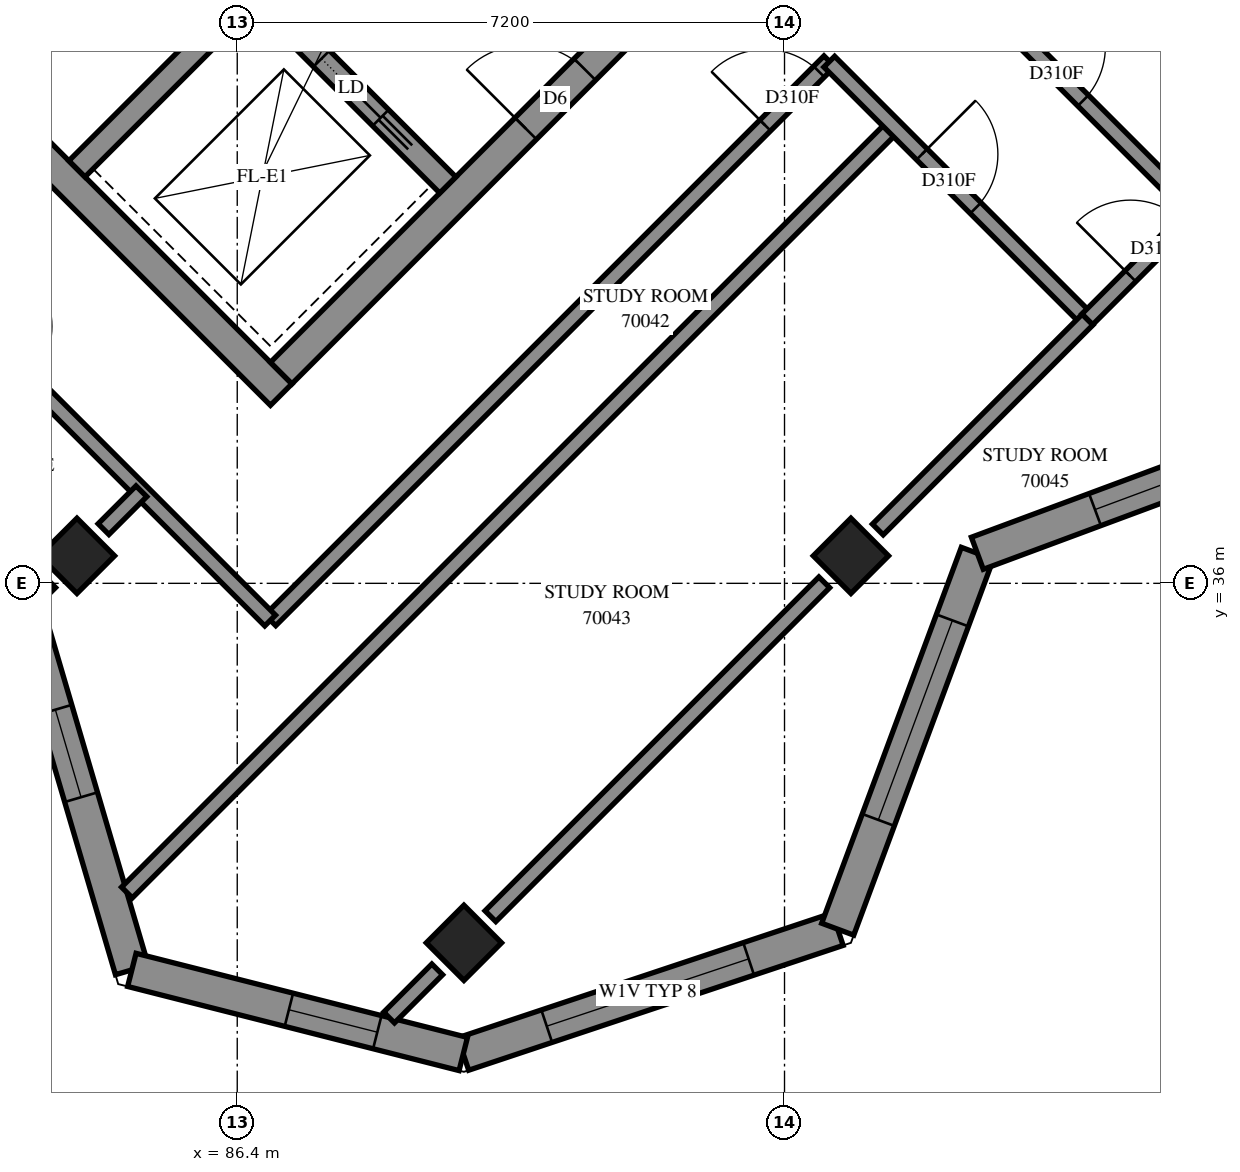
"""IFC4 building model, lengths in metres.
Left out: names, types, materials, properties, quantities, classifications, styles, units other than length and angle.
Written with IfcOpenShell. Run it as: python <this file> out.ifc"""

import sys

from ifc_helpers import new_model, si_unit, direction, frame, frame_2d, origin, origin_2d, place, context, subcontext, project, spatial, polyline, rectangle, outline, extrude, element, fill, save


model = new_model("IFC4")
c1 = context("Model", 3, precision=1e-05, world=origin(), true_north=direction((0.0, 1.0)))
c2 = subcontext(c1, "Body", "Model", "MODEL_VIEW")
j1 = project(units=[si_unit("LENGTHUNIT", "METRE"), si_unit("PLANEANGLEUNIT", "RADIAN")], contexts=[c1])
p1 = place(None, origin())
s1 = spatial("IfcSite", under=j1, at=p1, CompositionType="ELEMENT")
p2 = place(p1, origin())
s2 = spatial("IfcBuilding", under=s1, at=p2, CompositionType="ELEMENT")
p3 = place(p2, frame((0.0, 0.0, 257.4)))
s3 = spatial("IfcBuildingStorey", under=s2, at=p3, CompositionType="ELEMENT", Elevation=257.4)
for number, where, z_axis, x_axis in (
    (1, (84.291, 36.362, 0.0), (0.0, 0.0, 1.0), (0.707, -0.707, 0.0)),
    (2, (94.474, 36.362, 0.0), (0.0, 0.0, 1.0), (0.707, -0.707, 0.0)),
    (3, (89.382, 31.271, 0.0), (0.0, 0.0, 1.0), (0.707, -0.707, 0.0)),
):
    element("IfcColumn", number, at=place(p3, frame(where, z_axis=z_axis, x_axis=x_axis)), inside=s3, PredefinedType="COLUMN", context=c2, shape_type="SweptSolid", body=[
        extrude(rectangle(XDim=0.7, YDim=0.7, at=origin_2d()), origin(), (0.0, 0.0, 1.0), 3.1),
    ])
p4 = place(p3, frame((76.23, 49.231, -0.3), z_axis=(0.0, 0.0, 1.0), x_axis=(0.7071034917, -0.7071100706, 0.0)))
e4 = element("IfcWall", 4, at=p4, inside=s3, PredefinedType="SHEAR", context=c2, shape_type="SweptSolid", body=[
    extrude(rectangle(XDim=15.2, YDim=0.4, at=frame_2d((7.6, 0.0))), origin(), (0.0, 0.0, 1.0), 2.7),
])
p5 = place(p3, frame((86.978, 38.766, -0.3), z_axis=(0.0, 0.0, 1.0), x_axis=(0.7071067812, 0.7071067812, 0.0)))
e5 = element("IfcWall", 5, at=p5, inside=s3, PredefinedType="SHEAR", context=c2, shape_type="SweptSolid", body=[
    extrude(rectangle(XDim=14.4, YDim=0.4, at=frame_2d((7.2, 0.0))), origin(), (0.0, 0.0, 1.0), 2.7),
])
p6 = place(p5, frame((4.55, 0.0, 0.3)))
e6 = element("IfcOpeningElement", 6, at=p6, cuts=e5, PredefinedType="OPENING", context=c2, shape_type="SweptSolid", body=[
    extrude(rectangle(XDim=1.1, YDim=2.1, at=frame_2d((0.55, 1.05))), frame((0.0, 0.21, 0.0), z_axis=(0.0, -1.0, 0.0), x_axis=(1.0, 0.0, 0.0)), (0.0, 0.0, 1.0), 0.42),
])
p7 = place(p5, frame((11.35, 0.0, 0.3)))
e7 = element("IfcOpeningElement", 7, at=p7, cuts=e5, PredefinedType="OPENING", context=c2, shape_type="SweptSolid", body=[
    extrude(rectangle(XDim=1.1, YDim=2.1, at=frame_2d((0.55, 1.05))), frame((0.0, 0.21, 0.0), z_axis=(0.0, -1.0, 0.0), x_axis=(1.0, 0.0, 0.0)), (0.0, 0.0, 1.0), 0.42),
])
p8 = place(p3, frame((84.291, 41.453, 0.0), z_axis=(0.0, 0.0, 1.0), x_axis=(0.7071067812, 0.7071067812, 0.0)))
e8 = element("IfcWall", 8, at=p8, inside=s3, PredefinedType="SOLIDWALL", context=c2, shape_type="SweptSolid", body=[
    extrude(rectangle(XDim=3.3, YDim=0.3, at=frame_2d((1.65, 0.0))), origin(), (0.0, 0.0, 1.0), 3.1),
])
p9 = place(p3, frame((78.988, 51.423, 0.0), z_axis=(0.0, 0.0, 1.0), x_axis=(0.7071067812, -0.7071067812, 0.0)))
e9 = element("IfcWall", 9, at=p9, inside=s3, PredefinedType="SOLIDWALL", context=c2, shape_type="SweptSolid", body=[
    extrude(rectangle(XDim=14.4, YDim=0.3, at=frame_2d((7.2, 0.0))), origin(), (0.0, 0.0, 1.0), 3.1),
])
p10 = place(p9, frame((1.35, 0.0, 0.0)))
e10 = element("IfcOpeningElement", 10, at=p10, cuts=e9, PredefinedType="OPENING", context=c2, shape_type="SweptSolid", body=[
    extrude(rectangle(XDim=0.9, YDim=2.1, at=frame_2d((0.45, 1.05))), frame((0.0, 0.16, 0.0), z_axis=(0.0, -1.0, 0.0), x_axis=(1.0, 0.0, 0.0)), (0.0, 0.0, 1.0), 0.32),
])
p11 = place(p9, frame((4.95, 0.0, 0.0)))
e11 = element("IfcOpeningElement", 11, at=p11, cuts=e9, PredefinedType="OPENING", context=c2, shape_type="SweptSolid", body=[
    extrude(rectangle(XDim=0.9, YDim=2.1, at=frame_2d((0.45, 1.05))), frame((0.0, 0.16, 0.0), z_axis=(0.0, -1.0, 0.0), x_axis=(1.0, 0.0, 0.0)), (0.0, 0.0, 1.0), 0.32),
])
p12 = place(p9, frame((8.55, 0.0, 0.0)))
e12 = element("IfcOpeningElement", 12, at=p12, cuts=e9, PredefinedType="OPENING", context=c2, shape_type="SweptSolid", body=[
    extrude(rectangle(XDim=0.9, YDim=2.1, at=frame_2d((0.45, 1.05))), frame((0.0, 0.16, 0.0), z_axis=(0.0, -1.0, 0.0), x_axis=(1.0, 0.0, 0.0)), (0.0, 0.0, 1.0), 0.32),
])
p13 = place(p9, frame((12.05, 0.0, 0.0)))
e13 = element("IfcOpeningElement", 13, at=p13, cuts=e9, PredefinedType="OPENING", context=c2, shape_type="SweptSolid", body=[
    extrude(rectangle(XDim=1.1, YDim=2.1, at=frame_2d((0.55, 1.05))), frame((0.0, 0.16, 0.0), z_axis=(0.0, -1.0, 0.0), x_axis=(1.0, 0.0, 0.0)), (0.0, 0.0, 1.0), 0.32),
])
p14 = place(p3, frame((89.374, 29.808, 0.0), z_axis=(0.0, 0.0, 1.0), x_axis=(0.9486852237, 0.3162219889, 0.0)))
e14 = element("IfcWall", 14, at=p14, inside=s3, PredefinedType="SOLIDWALL", context=c2, shape_type="SweptSolid", body=[
    extrude(outline(polyline([(-0.066, -0.225), (5.301, -0.225), (5.085, 0.225), (0.066, 0.225), (-0.066, -0.225)])), origin(), (0.0, 0.0, 1.0), 3.1),
])
p15 = place(p14, frame((1.157, 0.0, 0.45)))
e15 = element("IfcOpeningElement", 15, at=p15, cuts=e14, PredefinedType="OPENING", context=c2, shape_type="SweptSolid", body=[
    extrude(rectangle(XDim=2.8, YDim=2.55, at=frame_2d((1.4, 1.275))), frame((0.0, 0.235, 0.0), z_axis=(0.0, -1.0, 0.0), x_axis=(1.0, 0.0, 0.0)), (0.0, 0.0, 1.0), 0.47),
])
p16 = place(p3, frame((94.3, 31.45, 0.0), z_axis=(0.0, 0.0, 1.0), x_axis=(0.3481927166, 0.9374229739, 0.0)))
e16 = element("IfcWall", 16, at=p16, inside=s3, PredefinedType="SOLIDWALL", context=c2, shape_type="SweptSolid", body=[
    extrude(outline(polyline([(-0.108, -0.225), (5.172, -0.225), (5.379, 0.225), (0.108, 0.225), (-0.108, -0.225)])), origin(), (0.0, 0.0, 1.0), 3.1),
])
p17 = place(p16, frame((1.534, 0.0, 0.45)))
e17 = element("IfcOpeningElement", 17, at=p17, cuts=e16, PredefinedType="OPENING", context=c2, shape_type="SweptSolid", body=[
    extrude(rectangle(XDim=2.8, YDim=2.55, at=frame_2d((1.4, 1.275))), frame((0.0, 0.235, 0.0), z_axis=(0.0, -1.0, 0.0), x_axis=(1.0, 0.0, 0.0)), (0.0, 0.0, 1.0), 0.47),
])
p18 = place(p3, frame((96.137, 36.395, 0.0), z_axis=(0.0, 0.0, 1.0), x_axis=(0.937429161, 0.3481760591, 0.0)))
e18 = element("IfcWall", 18, at=p18, inside=s3, PredefinedType="SOLIDWALL", context=c2, shape_type="SweptSolid", body=[
    extrude(outline(polyline([(0.103, -0.225), (5.383, -0.225), (5.168, 0.225), (-0.103, 0.225), (0.103, -0.225)])), origin(), (0.0, 0.0, 1.0), 3.1),
])
p19 = place(p18, frame((1.651, 0.0, 0.45)))
e19 = element("IfcOpeningElement", 19, at=p19, cuts=e18, PredefinedType="OPENING", context=c2, shape_type="SweptSolid", body=[
    extrude(rectangle(XDim=2.8, YDim=2.55, at=frame_2d((1.4, 1.275))), frame((0.0, 0.235, 0.0), z_axis=(0.0, -1.0, 0.0), x_axis=(1.0, 0.0, 0.0)), (0.0, 0.0, 1.0), 0.47),
])
p20 = place(p3, frame((83.719, 35.316, 0.0), z_axis=(0.0, 0.0, 1.0), x_axis=(0.2820825406, -0.9593901398, 0.0)))
e20 = element("IfcWall", 20, at=p20, inside=s3, PredefinedType="SOLIDWALL", context=c2, shape_type="SweptSolid", body=[
    extrude(outline(polyline([(0.123, -0.225), (4.716, -0.225), (4.46, 0.225), (-0.123, 0.225), (0.123, -0.225)])), origin(), (0.0, 0.0, 1.0), 3.1),
])
p21 = place(p20, frame((1.02, 0.0, 0.45)))
e21 = element("IfcOpeningElement", 21, at=p21, cuts=e20, PredefinedType="OPENING", context=c2, shape_type="SweptSolid", body=[
    extrude(rectangle(XDim=1.2, YDim=2.55, at=frame_2d((0.6, 1.275))), frame((0.0, 0.235, 0.0), z_axis=(0.0, -1.0, 0.0), x_axis=(1.0, 0.0, 0.0)), (0.0, 0.0, 1.0), 0.47),
])
p22 = place(p3, frame((85.014, 30.914, 0.0), z_axis=(0.0, 0.0, 1.0), x_axis=(0.9692746151, -0.2459811384, 0.0)))
e22 = element("IfcWall", 22, at=p22, inside=s3, PredefinedType="SOLIDWALL", context=c2, shape_type="SweptSolid", body=[
    extrude(outline(polyline([(-0.128, -0.225), (4.564, -0.225), (4.432, 0.225), (0.128, 0.225), (-0.128, -0.225)])), origin(), (0.0, 0.0, 1.0), 3.1),
])
p23 = place(p22, frame((2.131, 0.0, 0.45)))
e23 = element("IfcOpeningElement", 23, at=p23, cuts=e22, PredefinedType="OPENING", context=c2, shape_type="SweptSolid", body=[
    extrude(rectangle(XDim=1.2, YDim=2.55, at=frame_2d((0.6, 1.275))), frame((0.0, 0.235, 0.0), z_axis=(0.0, -1.0, 0.0), x_axis=(1.0, 0.0, 0.0)), (0.0, 0.0, 1.0), 0.47),
])
p24 = place(p3, frame((84.949, 31.932, 0.0), z_axis=(0.0, 0.0, 1.0), x_axis=(0.7071768688, 0.7070366866, 0.0)))
e24 = element("IfcWall", 24, at=p24, inside=s3, PredefinedType="PARTITIONING", context=c2, shape_type="SweptSolid", body=[
    extrude(rectangle(XDim=14.267, YDim=0.2, at=frame_2d((7.134, 0.0))), origin(), (0.0, 0.0, 1.0), 3.1),
])
p25 = place(p3, frame((86.836, 35.514, 0.0), z_axis=(0.0, 0.0, 1.0), x_axis=(0.7071067812, 0.7071067812, 0.0)))
e25 = element("IfcWall", 25, at=p25, inside=s3, PredefinedType="PARTITIONING", context=c2, shape_type="SweptSolid", body=[
    extrude(rectangle(XDim=10.4, YDim=0.2, at=frame_2d((5.2, 0.0))), origin(), (0.0, 0.0, 1.0), 3.1),
])
p26 = place(p25, frame((9.207, 0.0, 0.0)))
e26 = element("IfcOpeningElement", 26, at=p26, cuts=e25, PredefinedType="OPENING", context=c2, shape_type="SweptSolid", body=[
    extrude(rectangle(XDim=1.0, YDim=2.1, at=frame_2d((0.5, 1.05))), frame((0.0, 0.11, 0.0), z_axis=(0.0, -1.0, 0.0), x_axis=(1.0, 0.0, 0.0)), (0.0, 0.0, 1.0), 0.22),
])
p27 = place(p3, frame((80.747, 41.597, 0.0), z_axis=(0.0, 0.0, 1.0), x_axis=(0.7071067812, -0.7071067812, 0.0)))
e27 = element("IfcWall", 27, at=p27, inside=s3, PredefinedType="PARTITIONING", context=c2, shape_type="SweptSolid", body=[
    extrude(rectangle(XDim=8.607, YDim=0.2, at=frame_2d((4.303, 0.0))), origin(), (0.0, 0.0, 1.0), 3.1),
])
p28 = place(p27, frame((0.195, 0.0, 0.0)))
e28 = element("IfcOpeningElement", 28, at=p28, cuts=e27, PredefinedType="OPENING", context=c2, shape_type="SweptSolid", body=[
    extrude(rectangle(XDim=1.0, YDim=2.1, at=frame_2d((0.5, 1.05))), frame((0.0, 0.11, 0.0), z_axis=(0.0, -1.0, 0.0), x_axis=(1.0, 0.0, 0.0)), (0.0, 0.0, 1.0), 0.22),
])
p29 = place(p27, frame((3.133, 0.0, 0.0)))
e29 = element("IfcOpeningElement", 29, at=p29, cuts=e27, PredefinedType="OPENING", context=c2, shape_type="SweptSolid", body=[
    extrude(rectangle(XDim=1.0, YDim=2.1, at=frame_2d((0.5, 1.05))), frame((0.0, 0.11, 0.0), z_axis=(0.0, -1.0, 0.0), x_axis=(1.0, 0.0, 0.0)), (0.0, 0.0, 1.0), 0.22),
])
p30 = place(p3, frame((89.731, 31.621, 0.0), z_axis=(0.0, 0.0, 1.0), x_axis=(0.7071067812, 0.7071067812, 0.0)))
e30 = element("IfcWall", 30, at=p30, inside=s3, PredefinedType="PARTITIONING", context=c2, shape_type="SweptSolid", body=[
    extrude(rectangle(XDim=6.211, YDim=0.2, at=frame_2d((3.106, 0.0))), origin(), (0.0, 0.0, 1.0), 2.6),
])
p31 = place(p3, frame((95.603, 44.277, 0.0), z_axis=(0.0, 0.0, 1.0), x_axis=(0.7071067812, -0.7071067812, 0.0)))
e31 = element("IfcWall", 31, at=p31, inside=s3, PredefinedType="PARTITIONING", context=c2, shape_type="SweptSolid", body=[
    extrude(rectangle(XDim=4.797, YDim=0.2, at=frame_2d((2.398, 0.0))), origin(), (0.0, 0.0, 1.0), 3.1),
])
p32 = place(p31, frame((1.723, 0.0, 0.0)))
e32 = element("IfcOpeningElement", 32, at=p32, cuts=e31, PredefinedType="OPENING", context=c2, shape_type="SweptSolid", body=[
    extrude(rectangle(XDim=1.0, YDim=2.1, at=frame_2d((0.5, 1.05))), frame((0.0, 0.11, 0.0), z_axis=(0.0, -1.0, 0.0), x_axis=(1.0, 0.0, 0.0)), (0.0, 0.0, 1.0), 0.22),
])
p33 = place(p3, frame((94.189, 42.863, 0.0), z_axis=(0.0, 0.0, 1.0), x_axis=(0.7071067812, -0.7071067812, 0.0)))
e33 = element("IfcWall", 33, at=p33, inside=s3, PredefinedType="PARTITIONING", context=c2, shape_type="SweptSolid", body=[
    extrude(rectangle(XDim=4.797, YDim=0.2, at=frame_2d((2.398, 0.0))), origin(), (0.0, 0.0, 1.0), 3.1),
])
p34 = place(p33, frame((1.723, 0.0, 0.0)))
e34 = element("IfcOpeningElement", 34, at=p34, cuts=e33, PredefinedType="OPENING", context=c2, shape_type="SweptSolid", body=[
    extrude(rectangle(XDim=1.0, YDim=2.1, at=frame_2d((0.5, 1.05))), frame((0.0, 0.11, 0.0), z_axis=(0.0, -1.0, 0.0), x_axis=(1.0, 0.0, 0.0)), (0.0, 0.0, 1.0), 0.22),
])
p35 = place(p3, frame((94.828, 36.709, 0.0), z_axis=(0.0, 0.0, 1.0), x_axis=(0.7068506295, 0.7073628401, 0.0)))
e35 = element("IfcWall", 35, at=p35, inside=s3, PredefinedType="PARTITIONING", context=c2, shape_type="SweptSolid", body=[
    extrude(rectangle(XDim=3.905, YDim=0.2, at=frame_2d((1.952, 0.0))), origin(), (0.0, 0.0, 1.0), 2.6),
])
p36 = place(p3, frame((97.584, 39.474, 0.0), z_axis=(0.0, 0.0, 1.0), x_axis=(0.7071067812, 0.7071067812, 0.0)))
e36 = element("IfcWall", 36, at=p36, inside=s3, PredefinedType="PARTITIONING", context=c2, shape_type="SweptSolid", body=[
    extrude(rectangle(XDim=2.0, YDim=0.2, at=frame_2d((1.0, 0.0))), origin(), (0.0, 0.0, 1.0), 2.6),
])
p37 = place(p36, frame((0.803, 0.0, 0.0)))
e37 = element("IfcOpeningElement", 37, at=p37, cuts=e36, PredefinedType="OPENING", context=c2, shape_type="SweptSolid", body=[
    extrude(rectangle(XDim=1.0, YDim=2.1, at=frame_2d((0.5, 1.05))), frame((0.0, 0.11, 0.0), z_axis=(0.0, -1.0, 0.0), x_axis=(1.0, 0.0, 0.0)), (0.0, 0.0, 1.0), 0.22),
])
p38 = place(p3, frame((88.398, 30.288, 0.0), z_axis=(0.0, 0.0, 1.0), x_axis=(0.7070509474, 0.7071626105, 0.0)))
e38 = element("IfcWall", 38, at=p38, inside=s3, PredefinedType="PARTITIONING", context=c2, shape_type="SweptSolid", body=[
    extrude(rectangle(XDim=0.896, YDim=0.2, at=frame_2d((0.448, 0.0))), origin(), (0.0, 0.0, 1.0), 3.1),
])
p39 = place(p3, frame((84.641, 36.713, 0.0), z_axis=(0.0, 0.0, 1.0), x_axis=(0.7071067812, 0.7071067812, 0.0)))
e39 = element("IfcWall", 39, at=p39, inside=s3, PredefinedType="PARTITIONING", context=c2, shape_type="SweptSolid", body=[
    extrude(rectangle(XDim=0.704, YDim=0.2, at=frame_2d((0.352, 0.0))), origin(), (0.0, 0.0, 1.0), 3.1),
])
p40 = place(p3, frame((83.528, 35.607, 0.0), z_axis=(0.0, 0.0, 1.0), x_axis=(0.7090904806, 0.7051175011, 0.0)))
e40 = element("IfcWall", 40, at=p40, inside=s3, PredefinedType="PARTITIONING", context=c2, shape_type="SweptSolid", body=[
    extrude(rectangle(XDim=0.579, YDim=0.2, at=frame_2d((0.289, 0.0))), origin(), (0.0, 0.0, 1.0), 3.1),
])
p41 = place(p15, origin())
e41 = element("IfcWindow", 41, at=p41, inside=s3, PartitioningType="SINGLE_PANEL", PredefinedType="WINDOW", context=c2, shape_type="SweptSolid", body=[
    extrude(rectangle(XDim=2.8, YDim=2.55, at=frame_2d((1.4, 1.275))), frame((0.0, 0.205, 0.0), z_axis=(0.0, -1.0, 0.0), x_axis=(1.0, 0.0, 0.0)), (0.0, 0.0, 1.0), 0.06),
])
fill(e15, e41)
p42 = place(p17, origin())
e42 = element("IfcWindow", 42, at=p42, inside=s3, PartitioningType="SINGLE_PANEL", PredefinedType="WINDOW", context=c2, shape_type="SweptSolid", body=[
    extrude(rectangle(XDim=2.8, YDim=2.55, at=frame_2d((1.4, 1.275))), frame((0.0, 0.205, 0.0), z_axis=(0.0, -1.0, 0.0), x_axis=(1.0, 0.0, 0.0)), (0.0, 0.0, 1.0), 0.06),
])
fill(e17, e42)
p43 = place(p19, origin())
e43 = element("IfcWindow", 43, at=p43, inside=s3, PartitioningType="SINGLE_PANEL", PredefinedType="WINDOW", context=c2, shape_type="SweptSolid", body=[
    extrude(rectangle(XDim=2.8, YDim=2.55, at=frame_2d((1.4, 1.275))), frame((0.0, 0.205, 0.0), z_axis=(0.0, -1.0, 0.0), x_axis=(1.0, 0.0, 0.0)), (0.0, 0.0, 1.0), 0.06),
])
fill(e19, e43)
p44 = place(p21, origin())
e44 = element("IfcWindow", 44, at=p44, inside=s3, PartitioningType="SINGLE_PANEL", PredefinedType="WINDOW", context=c2, shape_type="SweptSolid", body=[
    extrude(rectangle(XDim=1.2, YDim=2.55, at=frame_2d((0.6, 1.275))), frame((0.0, 0.205, 0.0), z_axis=(0.0, -1.0, 0.0), x_axis=(1.0, 0.0, 0.0)), (0.0, 0.0, 1.0), 0.06),
])
fill(e21, e44)
p45 = place(p23, origin())
e45 = element("IfcWindow", 45, at=p45, inside=s3, PartitioningType="SINGLE_PANEL", PredefinedType="WINDOW", context=c2, shape_type="SweptSolid", body=[
    extrude(rectangle(XDim=1.2, YDim=2.55, at=frame_2d((0.6, 1.275))), frame((0.0, 0.205, 0.0), z_axis=(0.0, -1.0, 0.0), x_axis=(1.0, 0.0, 0.0)), (0.0, 0.0, 1.0), 0.06),
])
fill(e23, e45)
p46 = place(p6, origin())
e46 = element("IfcDoor", 46, at=p46, inside=s3, OperationType="DOUBLE_DOOR_SINGLE_SWING", PredefinedType="DOOR", context=c2, shape_type="SweptSolid", body=[
    extrude(rectangle(XDim=1.1, YDim=2.1, at=frame_2d((0.55, 1.05))), frame((0.0, 0.025, 0.0), z_axis=(0.0, -1.0, 0.0), x_axis=(1.0, 0.0, 0.0)), (0.0, 0.0, 1.0), 0.05),
])
fill(e6, e46)
p47 = place(p13, origin())
e47 = element("IfcDoor", 47, at=p47, inside=s3, OperationType="SLIDING_TO_RIGHT", PredefinedType="DOOR", context=c2, shape_type="SweptSolid", body=[
    extrude(rectangle(XDim=1.1, YDim=2.1, at=frame_2d((0.55, 1.05))), frame((0.0, 0.025, 0.0), z_axis=(0.0, -1.0, 0.0), x_axis=(1.0, 0.0, 0.0)), (0.0, 0.0, 1.0), 0.05),
])
fill(e13, e47)
p48 = place(p26, origin())
e48 = element("IfcDoor", 48, at=p48, inside=s3, OperationType="SINGLE_SWING_RIGHT", PredefinedType="DOOR", context=c2, shape_type="SweptSolid", body=[
    extrude(rectangle(XDim=1.0, YDim=2.1, at=frame_2d((0.5, 1.05))), frame((0.0, 0.025, 0.0), z_axis=(0.0, -1.0, 0.0), x_axis=(1.0, 0.0, 0.0)), (0.0, 0.0, 1.0), 0.05),
])
fill(e26, e48)
p49 = place(p34, origin())
e49 = element("IfcDoor", 49, at=p49, inside=s3, OperationType="SINGLE_SWING_LEFT", PredefinedType="DOOR", context=c2, shape_type="SweptSolid", body=[
    extrude(rectangle(XDim=1.0, YDim=2.1, at=frame_2d((0.5, 1.05))), frame((0.0, 0.025, 0.0), z_axis=(0.0, -1.0, 0.0), x_axis=(1.0, 0.0, 0.0)), (0.0, 0.0, 1.0), 0.05),
])
fill(e34, e49)
p50 = place(p32, origin())
e50 = element("IfcDoor", 50, at=p50, inside=s3, OperationType="SINGLE_SWING_RIGHT", PredefinedType="DOOR", context=c2, shape_type="SweptSolid", body=[
    extrude(rectangle(XDim=1.0, YDim=2.1, at=frame_2d((0.5, 1.05))), frame((0.0, 0.025, 0.0), z_axis=(0.0, -1.0, 0.0), x_axis=(1.0, 0.0, 0.0)), (0.0, 0.0, 1.0), 0.05),
])
fill(e32, e50)
p51 = place(p37, origin())
e51 = element("IfcDoor", 51, at=p51, inside=s3, OperationType="SINGLE_SWING_RIGHT", PredefinedType="DOOR", context=c2, shape_type="SweptSolid", body=[
    extrude(rectangle(XDim=1.0, YDim=2.1, at=frame_2d((0.5, 1.05))), frame((0.0, 0.025, 0.0), z_axis=(0.0, -1.0, 0.0), x_axis=(1.0, 0.0, 0.0)), (0.0, 0.0, 1.0), 0.05),
])
fill(e37, e51)
save(model, sys.argv[1])
